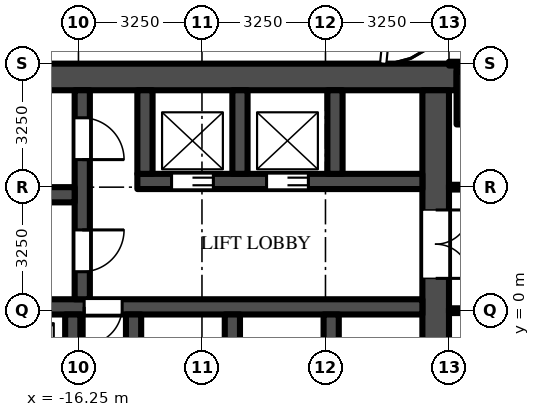
"""IFC4 building model, lengths in metres.
Left out: names, types, materials, properties, quantities, classifications, styles, units other than length and angle.
Written with IfcOpenShell. Run it as: python <this file> out.ifc"""

import sys

from ifc_helpers import new_model, si_unit, direction, frame, frame_2d, origin, origin_2d, place, context, subcontext, project, spatial, rectangle, extrude, source, transform, mapped, element, fill, save


model = new_model("IFC4")
c1 = context("Model", 3, precision=1e-05, world=origin(), true_north=direction((0.0, 1.0)))
c2 = subcontext(c1, "Body", "Model", "MODEL_VIEW")
j1 = project(units=[si_unit("LENGTHUNIT", "METRE"), si_unit("PLANEANGLEUNIT", "RADIAN")], contexts=[c1])
p1 = place(None, origin())
s1 = spatial("IfcSite", under=j1, at=p1, CompositionType="ELEMENT")
p2 = place(p1, origin())
s2 = spatial("IfcBuilding", under=s1, at=p2, CompositionType="ELEMENT")
p3 = place(p2, frame((0.0, 0.0, 34.0)))
s3 = spatial("IfcBuildingStorey", under=s2, at=p3, CompositionType="ELEMENT", Elevation=34.0)
m1 = source(origin(), c2, "Body", "SweptSolid", [
    extrude(rectangle(XDim=1.4, YDim=1.4, at=origin_2d()), origin(), (0.0, 0.0, 1.0), 4.5),
])
p4 = place(p3, frame((-5.6, 5.6, 0.0), z_axis=(0.0, 0.0, 1.0), x_axis=(1.0, 0.0, 0.0)))
e1 = element("IfcColumn", 1, at=p4, inside=s3, PredefinedType="COLUMN", context=c2, shape_type="MappedRepresentation", body=[
    mapped(m1, transform((0.0, 0.0, 0.0))),
])
m2 = source(origin(), c2, "Body", "SweptSolid", [
    extrude(rectangle(XDim=16.45, YDim=0.7, at=frame_2d((8.225, 0.0))), origin(), (0.0, 0.0, 1.0), 4.25),
])
p5 = place(p3, frame((-6.3, 6.15, 0.0), z_axis=(0.0, 0.0, 1.0), x_axis=(-1.0, 0.0, 0.0)))
e2 = element("IfcWall", 2, at=p5, inside=s3, PredefinedType="SHEAR", context=c2, shape_type="MappedRepresentation", body=[
    mapped(m2, transform((0.0, 0.0, 0.0))),
])
m3 = source(origin(), c2, "Body", "SweptSolid", [
    extrude(rectangle(XDim=9.05, YDim=0.7, at=frame_2d((4.525, 0.0))), origin(), (0.0, 0.0, 1.0), 4.25),
])
p6 = place(p3, frame((-6.85, 5.8, 0.0), z_axis=(0.0, 0.0, 1.0), x_axis=(0.0, -1.0, 0.0)))
e3 = element("IfcWall", 3, at=p6, inside=s3, PredefinedType="SHEAR", context=c2, shape_type="MappedRepresentation", body=[
    mapped(m3, transform((0.0, 0.0, 0.0))),
])
m4 = source(origin(), c2, "Body", "SweptSolid", [
    extrude(rectangle(XDim=1.8, YDim=2.1, at=frame_2d((0.9, 1.05))), frame((0.0, 0.36, 0.0), z_axis=(0.0, -1.0, 0.0), x_axis=(1.0, 0.0, 0.0)), (0.0, 0.0, 1.0), 0.72),
])
p7 = place(p6, frame((3.15, 0.0, 0.0)))
e4 = element("IfcOpeningElement", 4, at=p7, cuts=e3, PredefinedType="OPENING", context=c2, shape_type="MappedRepresentation", body=[
    mapped(m4, transform((0.0, 0.0, 0.0))),
])
m5 = source(origin(), c2, "Body", "SweptSolid", [
    extrude(rectangle(XDim=7.5, YDim=0.4, at=frame_2d((3.75, 0.0))), origin(), (0.0, 0.0, 1.0), 4.25),
])
p8 = place(p3, frame((-7.2, 3.4, 0.0), z_axis=(0.0, 0.0, 1.0), x_axis=(-1.0, 0.0, 0.0)))
e5 = element("IfcWall", 5, at=p8, inside=s3, PredefinedType="SHEAR", context=c2, shape_type="MappedRepresentation", body=[
    mapped(m5, transform((0.0, 0.0, 0.0))),
])
m6 = source(origin(), c2, "Body", "SweptSolid", [
    extrude(rectangle(XDim=1.1, YDim=2.1, at=frame_2d((0.55, 1.05))), frame((0.0, 0.21, 0.0), z_axis=(0.0, -1.0, 0.0), x_axis=(1.0, 0.0, 0.0)), (0.0, 0.0, 1.0), 0.42),
])
p9 = place(p8, frame((3.0, 0.0, 0.0)))
e6 = element("IfcOpeningElement", 6, at=p9, cuts=e5, PredefinedType="OPENING", context=c2, shape_type="MappedRepresentation", body=[
    mapped(m6, transform((0.0, 0.0, 0.0))),
])
p10 = place(p8, frame((5.5, 0.0, 0.0)))
e7 = element("IfcOpeningElement", 7, at=p10, cuts=e5, PredefinedType="OPENING", context=c2, shape_type="MappedRepresentation", body=[
    mapped(m6, transform((0.0, 0.0, 0.0))),
])
m7 = source(origin(), c2, "Body", "SweptSolid", [
    extrude(rectangle(XDim=14.85, YDim=0.4, at=frame_2d((7.425, 0.0))), origin(), (0.0, 0.0, 1.0), 4.25),
])
p11 = place(p3, frame((-7.2, 0.1, 0.0), z_axis=(0.0, 0.0, 1.0), x_axis=(-1.0, 0.0, 0.0)))
e8 = element("IfcWall", 8, at=p11, inside=s3, PredefinedType="SHEAR", context=c2, shape_type="MappedRepresentation", body=[
    mapped(m7, transform((0.0, 0.0, 0.0))),
])
m8 = source(origin(), c2, "Body", "SweptSolid", [
    extrude(rectangle(XDim=1.0, YDim=2.1, at=frame_2d((0.5, 1.05))), frame((0.0, 0.21, 0.0), z_axis=(0.0, -1.0, 0.0), x_axis=(1.0, 0.0, 0.0)), (0.0, 0.0, 1.0), 0.42),
])
p12 = place(p11, frame((7.9, 0.0, 0.0)))
e9 = element("IfcOpeningElement", 9, at=p12, cuts=e8, PredefinedType="OPENING", context=c2, shape_type="MappedRepresentation", body=[
    mapped(m8, transform((0.0, 0.0, 0.0))),
])
m9 = source(origin(), c2, "Body", "SweptSolid", [
    extrude(rectangle(XDim=5.5, YDim=0.4, at=frame_2d((2.75, 0.0))), origin(), (0.0, 0.0, 1.0), 4.25),
])
p13 = place(p3, frame((-16.15, 5.8, 0.0), z_axis=(0.0, 0.0, 1.0), x_axis=(0.0, -1.0, 0.0)))
e10 = element("IfcWall", 10, at=p13, inside=s3, PredefinedType="SHEAR", context=c2, shape_type="MappedRepresentation", body=[
    mapped(m9, transform((0.0, 0.0, 0.0))),
])
p14 = place(p13, frame((0.725, 0.0, 0.0)))
e11 = element("IfcOpeningElement", 11, at=p14, cuts=e10, PredefinedType="OPENING", context=c2, shape_type="MappedRepresentation", body=[
    mapped(m6, transform((0.0, 0.0, 0.0))),
])
p15 = place(p13, frame((3.675, 0.0, 0.0)))
e12 = element("IfcOpeningElement", 12, at=p15, cuts=e10, PredefinedType="OPENING", context=c2, shape_type="MappedRepresentation", body=[
    mapped(m6, transform((0.0, 0.0, 0.0))),
])
m10 = source(origin(), c2, "Body", "SweptSolid", [
    extrude(rectangle(XDim=5.7, YDim=0.4, at=frame_2d((2.85, 0.0))), origin(), (0.0, 0.0, 1.0), 4.25),
])
p16 = place(p3, frame((-16.35, 3.05, 0.0), z_axis=(0.0, 0.0, 1.0), x_axis=(-1.0, 0.0, 0.0)))
e13 = element("IfcWall", 13, at=p16, inside=s3, PredefinedType="SHEAR", context=c2, shape_type="MappedRepresentation", body=[
    mapped(m10, transform((0.0, 0.0, 0.0))),
])
m11 = source(origin(), c2, "Body", "SweptSolid", [
    extrude(rectangle(XDim=2.2, YDim=0.4, at=frame_2d((1.1, 0.0))), origin(), (0.0, 0.0, 1.0), 4.25),
])
for number, where, z_axis, x_axis in (
    (14, (-9.5, 5.8, 0.0), (0.0, 0.0, 1.0), (0.0, -1.0, 0.0)),
    (15, (-12.0, 5.8, 0.0), (0.0, 0.0, 1.0), (0.0, -1.0, 0.0)),
    (16, (-14.5, 5.8, 0.0), (0.0, 0.0, 1.0), (0.0, -1.0, 0.0)),
):
    element("IfcWall", number, at=place(p3, frame(where, z_axis=z_axis, x_axis=x_axis)), inside=s3, PredefinedType="SHEAR", context=c2, shape_type="MappedRepresentation", body=[
        mapped(m11, transform((0.0, 0.0, 0.0))),
    ])
m12 = source(origin(), c2, "Body", "SweptSolid", [
    extrude(rectangle(XDim=2.45, YDim=0.4, at=frame_2d((1.225, 0.0))), origin(), (0.0, 0.0, 1.0), 4.25),
])
for number, where, z_axis, x_axis in (
    (17, (-9.6, -0.1, 0.0), (0.0, 0.0, 1.0), (0.0, -1.0, 0.0)),
    (18, (-12.2, -0.1, 0.0), (0.0, 0.0, 1.0), (0.0, -1.0, 0.0)),
    (19, (-14.8, -0.1, 0.0), (0.0, 0.0, 1.0), (0.0, -1.0, 0.0)),
    (20, (-16.4, -0.1, 0.0), (0.0, 0.0, 1.0), (0.0, -1.0, 0.0)),
):
    element("IfcWall", number, at=place(p3, frame(where, z_axis=z_axis, x_axis=x_axis)), inside=s3, PredefinedType="SHEAR", context=c2, shape_type="MappedRepresentation", body=[
        mapped(m12, transform((0.0, 0.0, 0.0))),
    ])
m13 = source(origin(), c2, "Body", "SweptSolid", [
    extrude(rectangle(XDim=5.363, YDim=0.125, at=frame_2d((2.681, 0.0))), origin(), (0.0, 0.0, 1.0), 3.468),
])
p17 = place(p3, frame((-1.137, 0.0, 0.0), z_axis=(0.0, 0.0, 1.0), x_axis=(-1.0, 0.0, 0.0)))
e21 = element("IfcWall", 21, at=p17, inside=s3, PredefinedType="PARTITIONING", context=c2, shape_type="MappedRepresentation", body=[
    mapped(m13, transform((0.0, 0.0, 0.0))),
])
p18 = place(p3, frame((-6.5, 3.25, 0.0), z_axis=(0.0, 0.0, 1.0), x_axis=(1.0, 0.0, 0.0)))
e22 = element("IfcWall", 22, at=p18, inside=s3, PredefinedType="PARTITIONING", context=c2, shape_type="MappedRepresentation", body=[
    mapped(m13, transform((0.0, 0.0, 0.0))),
])
m14 = source(origin(), c2, "Body", "SweptSolid", [
    extrude(rectangle(XDim=1.0, YDim=2.1, at=frame_2d((0.5, 1.05))), frame((0.0, 0.073, 0.0), z_axis=(0.0, -1.0, 0.0), x_axis=(1.0, 0.0, 0.0)), (0.0, 0.0, 1.0), 0.145),
])
p19 = place(p18, frame((3.95, 0.0, 0.0)))
e23 = element("IfcOpeningElement", 23, at=p19, cuts=e22, PredefinedType="OPENING", context=c2, shape_type="MappedRepresentation", body=[
    mapped(m14, transform((0.0, 0.0, 0.0))),
])
m15 = source(origin(), c2, "Body", "SweptSolid", [
    extrude(rectangle(XDim=5.363, YDim=0.1, at=frame_2d((2.681, 0.0))), origin(), (0.0, 0.0, 1.0), 3.33),
])
p20 = place(p3, frame((-6.5, 6.5, 0.0), z_axis=(0.0, 0.0, 1.0), x_axis=(1.0, 0.0, 0.0)))
e24 = element("IfcWall", 24, at=p20, inside=s3, PredefinedType="PARTITIONING", context=c2, shape_type="MappedRepresentation", body=[
    mapped(m15, transform((0.0, 0.0, 0.0))),
])
m16 = source(origin(), c2, "Body", "SweptSolid", [
    extrude(rectangle(XDim=1.1, YDim=2.1, at=frame_2d((0.55, 1.05))), frame((0.0, 0.025, 0.0), z_axis=(0.0, -1.0, 0.0), x_axis=(1.0, 0.0, 0.0)), (0.0, 0.0, 1.0), 0.05),
])
p21 = place(p9, origin())
e25 = element("IfcDoor", 25, at=p21, inside=s3, OperationType="DOUBLE_DOOR_SLIDING", PredefinedType="DOOR", context=c2, shape_type="MappedRepresentation", body=[
    mapped(m16, transform((0.0, 0.0, 0.0))),
])
fill(e6, e25)
p22 = place(p10, origin())
e26 = element("IfcDoor", 26, at=p22, inside=s3, OperationType="DOUBLE_DOOR_SLIDING", PredefinedType="DOOR", context=c2, shape_type="MappedRepresentation", body=[
    mapped(m16, transform((0.0, 0.0, 0.0))),
])
fill(e7, e26)
m17 = source(origin(), c2, "Body", "SweptSolid", [
    extrude(rectangle(XDim=1.8, YDim=2.1, at=frame_2d((0.9, 1.05))), frame((0.0, -0.275, 0.0), z_axis=(0.0, -1.0, 0.0), x_axis=(1.0, 0.0, 0.0)), (0.0, 0.0, 1.0), 0.05),
])
p23 = place(p7, origin())
e27 = element("IfcDoor", 27, at=p23, inside=s3, OperationType="DOUBLE_DOOR_SINGLE_SWING", PredefinedType="DOOR", context=c2, shape_type="MappedRepresentation", body=[
    mapped(m17, transform((0.0, 0.0, 0.0))),
])
fill(e4, e27)
p24 = place(p14, origin())
e28 = element("IfcDoor", 28, at=p24, inside=s3, OperationType="SINGLE_SWING_RIGHT", PredefinedType="DOOR", context=c2, shape_type="MappedRepresentation", body=[
    mapped(m16, transform((0.0, 0.0, 0.0))),
])
fill(e11, e28)
p25 = place(p15, origin())
e29 = element("IfcDoor", 29, at=p25, inside=s3, OperationType="SINGLE_SWING_LEFT", PredefinedType="DOOR", context=c2, shape_type="MappedRepresentation", body=[
    mapped(m16, transform((0.0, 0.0, 0.0))),
])
fill(e12, e29)
m18 = source(origin(), c2, "Body", "SweptSolid", [
    extrude(rectangle(XDim=1.0, YDim=2.1, at=frame_2d((0.5, 1.05))), frame((0.0, 0.025, 0.0), z_axis=(0.0, -1.0, 0.0), x_axis=(1.0, 0.0, 0.0)), (0.0, 0.0, 1.0), 0.05),
])
p26 = place(p12, origin())
e30 = element("IfcDoor", 30, at=p26, inside=s3, OperationType="SINGLE_SWING_RIGHT", PredefinedType="DOOR", context=c2, shape_type="MappedRepresentation", body=[
    mapped(m18, transform((0.0, 0.0, 0.0))),
])
fill(e9, e30)
save(model, sys.argv[1])
